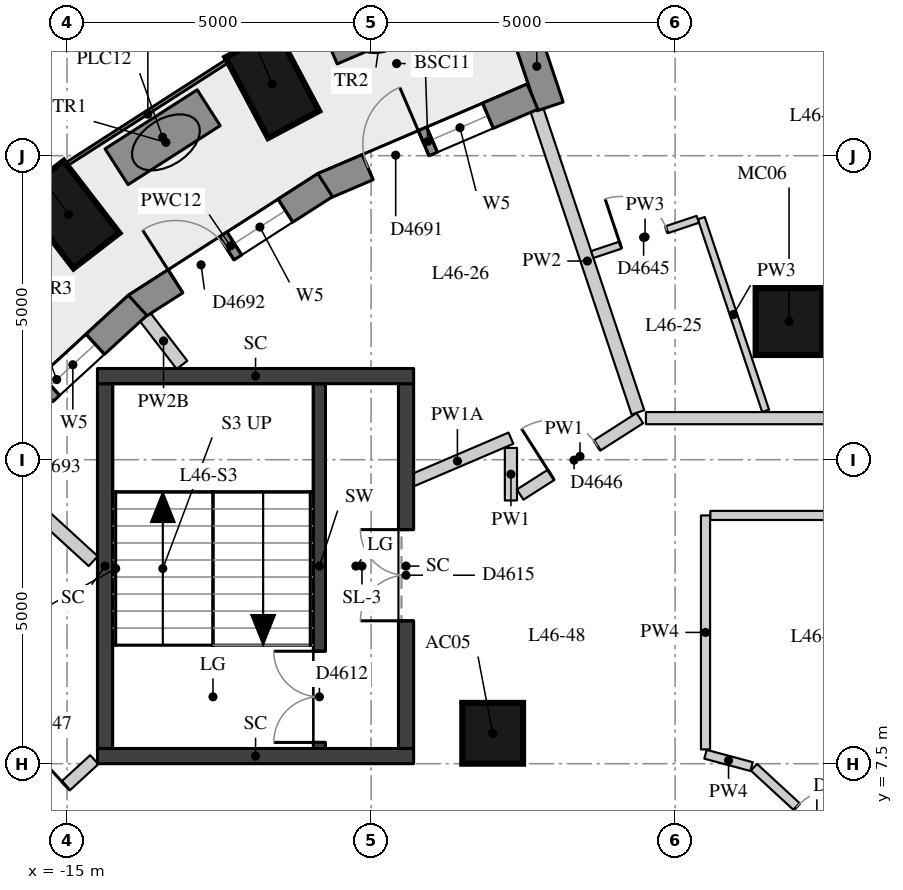
"""IFC4 building model, lengths in metres.
Left out: names, types, materials, properties, quantities, classifications, styles, units other than length and angle.
Written with IfcOpenShell. Run it as: python <this file> out.ifc"""

import sys

from ifc_helpers import new_model, si_unit, direction, frame, frame_2d, origin, origin_2d, place, context, subcontext, project, spatial, rectangle, extrude, element, fill, save


model = new_model("IFC4")
c1 = context("Model", 3, precision=1e-05, world=origin(), true_north=direction((0.0, 1.0)))
c2 = subcontext(c1, "Body", "Model", "MODEL_VIEW")
j1 = project(units=[si_unit("LENGTHUNIT", "METRE"), si_unit("PLANEANGLEUNIT", "RADIAN")], contexts=[c1])
p1 = place(None, origin())
s1 = spatial("IfcSite", under=j1, at=p1, CompositionType="ELEMENT")
p2 = place(p1, origin())
s2 = spatial("IfcBuilding", under=s1, at=p2, CompositionType="ELEMENT")
p3 = place(p2, frame((0.0, 0.0, 164.9)))
s3 = spatial("IfcBuildingStorey", under=s2, at=p3, CompositionType="ELEMENT", Elevation=164.9)
for number, where, z_axis, x_axis in (
    (1, (-11.625, 18.676, 0.0), (0.0, 0.0, 1.0), (-0.468, 0.884, 0.0)),
    (2, (-14.973, 16.532, 0.0), (0.0, 0.0, 1.0), (-0.61, 0.792, 0.0)),
):
    element("IfcColumn", number, at=place(p3, frame(where, z_axis=z_axis, x_axis=x_axis)), inside=s3, PredefinedType="COLUMN", context=c2, shape_type="SweptSolid", body=[
        extrude(rectangle(XDim=1.5, YDim=0.95, at=origin_2d()), origin(), (0.0, 0.0, 1.0), 3.3),
    ])
p4 = place(p3, frame((-8.0, 8.0, 0.0), z_axis=(0.0, 0.0, 1.0), x_axis=(1.0, 0.0, 0.0)))
e3 = element("IfcColumn", 3, at=p4, inside=s3, PredefinedType="COLUMN", context=c2, shape_type="SweptSolid", body=[
    extrude(rectangle(XDim=1.0, YDim=1.0, at=origin_2d()), origin(), (0.0, 0.0, 1.0), 3.3),
])
p5 = place(p3, frame((-3.126, 14.772, 0.0), z_axis=(0.0, 0.0, 1.0), x_axis=(1.0, 0.0, 0.0)))
e4 = element("IfcColumn", 4, at=p5, inside=s3, PredefinedType="COLUMN", context=c2, shape_type="SweptSolid", body=[
    extrude(rectangle(XDim=1.1, YDim=1.1, at=origin_2d()), origin(), (0.0, 0.0, 1.0), 3.3),
])
p6 = place(p3, frame((-7.495, 19.629, 0.0), z_axis=(0.0, 0.0, 1.0), x_axis=(0.316754470825, -0.948507567293, 0.0)))
e5 = element("IfcWall", 5, at=p6, inside=s3, PredefinedType="SOLIDWALL", context=c2, shape_type="SweptSolid", body=[
    extrude(rectangle(XDim=1.39, YDim=0.45, at=frame_2d((0.695, 0.0))), origin(), (0.0, 0.0, 1.0), 3.02),
])
p7 = place(p3, frame((-7.345, 18.47, 0.0), z_axis=(0.0, 0.0, 1.0), x_axis=(-0.919454986573, -0.393195279304, 0.0)))
e6 = element("IfcWall", 6, at=p7, inside=s3, PredefinedType="SOLIDWALL", context=c2, shape_type="SweptSolid", body=[
    extrude(rectangle(XDim=3.745, YDim=0.45, at=frame_2d((1.872, 0.0))), origin(), (0.0, 0.0, 1.0), 3.02),
])
p8 = place(p7, frame((0.797, 0.0, 0.4)))
e7 = element("IfcOpeningElement", 7, at=p8, cuts=e6, PredefinedType="OPENING", context=c2, shape_type="SweptSolid", body=[
    extrude(rectangle(XDim=1.0, YDim=1.75, at=frame_2d((0.5, 0.875))), frame((0.0, 0.235, 0.0), z_axis=(0.0, -1.0, 0.0), x_axis=(1.0, 0.0, 0.0)), (0.0, 0.0, 1.0), 0.47),
])
p9 = place(p7, frame((1.947, 0.0, 0.0)))
e8 = element("IfcOpeningElement", 8, at=p9, cuts=e6, PredefinedType="OPENING", context=c2, shape_type="SweptSolid", body=[
    extrude(rectangle(XDim=1.0, YDim=2.15, at=frame_2d((0.5, 1.075))), frame((0.0, 0.235, 0.0), z_axis=(0.0, -1.0, 0.0), x_axis=(1.0, 0.0, 0.0)), (0.0, 0.0, 1.0), 0.47),
])
p10 = place(p3, frame((-10.755, 17.016, 0.0), z_axis=(0.0, 0.0, 1.0), x_axis=(-0.841405539996, -0.540404216549, 0.0)))
e9 = element("IfcWall", 9, at=p10, inside=s3, PredefinedType="SOLIDWALL", context=c2, shape_type="SweptSolid", body=[
    extrude(rectangle(XDim=3.702, YDim=0.45, at=frame_2d((1.851, 0.0))), origin(), (0.0, 0.0, 1.0), 3.02),
])
p11 = place(p10, frame((0.776, 0.0, 0.4)))
e10 = element("IfcOpeningElement", 10, at=p11, cuts=e9, PredefinedType="OPENING", context=c2, shape_type="SweptSolid", body=[
    extrude(rectangle(XDim=1.0, YDim=1.75, at=frame_2d((0.5, 0.875))), frame((0.0, 0.235, 0.0), z_axis=(0.0, -1.0, 0.0), x_axis=(1.0, 0.0, 0.0)), (0.0, 0.0, 1.0), 0.47),
])
p12 = place(p10, frame((1.926, 0.0, 0.0)))
e11 = element("IfcOpeningElement", 11, at=p12, cuts=e9, PredefinedType="OPENING", context=c2, shape_type="SweptSolid", body=[
    extrude(rectangle(XDim=1.0, YDim=2.15, at=frame_2d((0.5, 1.075))), frame((0.0, 0.235, 0.0), z_axis=(0.0, -1.0, 0.0), x_axis=(1.0, 0.0, 0.0)), (0.0, 0.0, 1.0), 0.47),
])
p13 = place(p3, frame((-13.839, 15.039, 0.0), z_axis=(0.0, 0.0, 1.0), x_axis=(-0.736971705023, -0.675923594791, 0.0)))
e12 = element("IfcWall", 12, at=p13, inside=s3, PredefinedType="SOLIDWALL", context=c2, shape_type="SweptSolid", body=[
    extrude(rectangle(XDim=3.611, YDim=0.45, at=frame_2d((1.806, 0.0))), origin(), (0.0, 0.0, 1.0), 3.02),
])
p14 = place(p13, frame((0.946, 0.0, 0.4)))
e13 = element("IfcOpeningElement", 13, at=p14, cuts=e12, PredefinedType="OPENING", context=c2, shape_type="SweptSolid", body=[
    extrude(rectangle(XDim=1.0, YDim=1.75, at=frame_2d((0.5, 0.875))), frame((0.0, 0.235, 0.0), z_axis=(0.0, -1.0, 0.0), x_axis=(1.0, 0.0, 0.0)), (0.0, 0.0, 1.0), 0.47),
])
p15 = place(p13, frame((2.096, 0.0, 0.0)))
e14 = element("IfcOpeningElement", 14, at=p15, cuts=e12, PredefinedType="OPENING", context=c2, shape_type="SweptSolid", body=[
    extrude(rectangle(XDim=1.0, YDim=2.15, at=frame_2d((0.5, 1.075))), frame((0.0, 0.235, 0.0), z_axis=(0.0, -1.0, 0.0), x_axis=(1.0, 0.0, 0.0)), (0.0, 0.0, 1.0), 0.47),
])
for number, where, z_axis, x_axis in (
    (15, (-9.039, 20.038, 0.0), (0.0, 0.0, 1.0), (-0.92, -0.392, 0.0)),
    (16, (-12.67, 18.289, 0.0), (0.0, 0.0, 1.0), (-0.842, -0.539, 0.0)),
):
    element("IfcWall", number, at=place(p3, frame(where, z_axis=z_axis, x_axis=x_axis)), inside=s3, PredefinedType="USERDEFINED", context=c2, shape_type="SweptSolid", body=[
        extrude(rectangle(XDim=1.8, YDim=0.7, at=frame_2d((0.9, 0.0))), origin(), (0.0, 0.0, 1.0), 0.75),
    ])
p16 = place(p3, frame((-10.85, 7.75, 0.0), z_axis=(0.0, 0.0, 1.0), x_axis=(0.0, 1.0, 0.0)))
e17 = element("IfcWall", 17, at=p16, inside=s3, PredefinedType="SHEAR", context=c2, shape_type="SweptSolid", body=[
    extrude(rectangle(XDim=6.0, YDim=0.2, at=frame_2d((3.0, 0.0))), origin(), (0.0, 0.0, 1.0), 3.02),
])
p17 = place(p16, frame((0.1, 0.0, 0.0)))
e18 = element("IfcOpeningElement", 18, at=p17, cuts=e17, PredefinedType="OPENING", context=c2, shape_type="SweptSolid", body=[
    extrude(rectangle(XDim=1.5, YDim=2.1, at=frame_2d((0.75, 1.05))), frame((0.0, 0.11, 0.0), z_axis=(0.0, -1.0, 0.0), x_axis=(1.0, 0.0, 0.0)), (0.0, 0.0, 1.0), 0.22),
])
p18 = place(p3, frame((-14.375, 7.75, -0.28), z_axis=(0.0, 0.0, 1.0), x_axis=(0.0, 1.0, 0.0)))
e19 = element("IfcWall", 19, at=p18, inside=s3, PredefinedType="SHEAR", context=c2, shape_type="SweptSolid", body=[
    extrude(rectangle(XDim=6.0, YDim=0.25, at=frame_2d((3.0, 0.0))), origin(), (0.0, 0.0, 1.0), 3.3),
])
p19 = place(p3, frame((-9.425, 7.75, -0.28), z_axis=(0.0, 0.0, 1.0), x_axis=(0.0, 1.0, 0.0)))
e20 = element("IfcWall", 20, at=p19, inside=s3, PredefinedType="SHEAR", context=c2, shape_type="SweptSolid", body=[
    extrude(rectangle(XDim=6.0, YDim=0.25, at=frame_2d((3.0, 0.0))), origin(), (0.0, 0.0, 1.0), 3.3),
])
p20 = place(p19, frame((2.1, 0.0, 0.28)))
e21 = element("IfcOpeningElement", 21, at=p20, cuts=e20, PredefinedType="OPENING", context=c2, shape_type="SweptSolid", body=[
    extrude(rectangle(XDim=1.5, YDim=2.1, at=frame_2d((0.75, 1.05))), frame((0.0, 0.135, 0.0), z_axis=(0.0, -1.0, 0.0), x_axis=(1.0, 0.0, 0.0)), (0.0, 0.0, 1.0), 0.27),
])
for number, where, z_axis, x_axis in (
    (22, (-14.5, 13.875, -0.28), (0.0, 0.0, 1.0), (1.0, 0.0, 0.0)),
    (23, (-14.5, 7.625, -0.28), (0.0, 0.0, 1.0), (1.0, 0.0, 0.0)),
):
    element("IfcWall", number, at=place(p3, frame(where, z_axis=z_axis, x_axis=x_axis)), inside=s3, PredefinedType="SHEAR", context=c2, shape_type="SweptSolid", body=[
        extrude(rectangle(XDim=5.2, YDim=0.25, at=frame_2d((2.6, 0.0))), origin(), (0.0, 0.0, 1.0), 3.3),
    ])
p21 = place(p3, frame((-16.154, 6.097, 0.0), z_axis=(0.0, 0.0, 1.0), x_axis=(0.736958194284, 0.675938325498, 0.0)))
e24 = element("IfcWall", 24, at=p21, inside=s3, PredefinedType="PARTITIONING", context=c2, shape_type="SweptSolid", body=[
    extrude(rectangle(XDim=2.173, YDim=0.2, at=frame_2d((1.086, 0.0))), origin(), (0.0, 0.0, 1.0), 3.02),
])
p22 = place(p21, frame((0.636, 0.0, 0.0)))
e25 = element("IfcOpeningElement", 25, at=p22, cuts=e24, PredefinedType="OPENING", context=c2, shape_type="SweptSolid", body=[
    extrude(rectangle(XDim=0.9, YDim=2.1, at=frame_2d((0.45, 1.05))), frame((0.0, 0.11, 0.0), z_axis=(0.0, -1.0, 0.0), x_axis=(1.0, 0.0, 0.0)), (0.0, 0.0, 1.0), 0.22),
])
p23 = place(p3, frame((-9.46, 12.101, 0.0), z_axis=(0.0, 0.0, 1.0), x_axis=(0.919441549003, 0.393226700475, 0.0)))
e26 = element("IfcWall", 26, at=p23, inside=s3, PredefinedType="PARTITIONING", context=c2, shape_type="SweptSolid", body=[
    extrude(rectangle(XDim=1.915, YDim=0.2, at=frame_2d((0.958, 0.0))), origin(), (0.0, 0.0, 1.0), 2.57),
])
p24 = place(p3, frame((-7.7, 12.693, 0.0), z_axis=(0.0, 0.0, 1.0), x_axis=(0.0, -1.0, 0.0)))
e27 = element("IfcWall", 27, at=p24, inside=s3, PredefinedType="PARTITIONING", context=c2, shape_type="SweptSolid", body=[
    extrude(rectangle(XDim=0.864, YDim=0.2, at=frame_2d((0.432, 0.0))), origin(), (0.0, 0.0, 1.0), 3.02),
])
p25 = place(p3, frame((-7.548, 11.926, 0.0), z_axis=(0.0, 0.0, 1.0), x_axis=(0.842760799664, 0.538288244855, 0.0)))
e28 = element("IfcWall", 28, at=p25, inside=s3, PredefinedType="PARTITIONING", context=c2, shape_type="SweptSolid", body=[
    extrude(rectangle(XDim=2.336, YDim=0.2, at=frame_2d((1.168, 0.0))), origin(), (0.0, 0.0, 1.0), 3.02),
])
p26 = place(p25, frame((0.602, 0.0, 0.0)))
e29 = element("IfcOpeningElement", 29, at=p26, cuts=e28, PredefinedType="OPENING", context=c2, shape_type="SweptSolid", body=[
    extrude(rectangle(XDim=0.9, YDim=2.1, at=frame_2d((0.45, 1.05))), frame((0.0, 0.11, 0.0), z_axis=(0.0, -1.0, 0.0), x_axis=(1.0, 0.0, 0.0)), (0.0, 0.0, 1.0), 0.22),
])
p27 = place(p3, frame((-5.48, 13.183, 0.0), z_axis=(0.0, 0.0, 1.0), x_axis=(1.0, 0.0, 0.0)))
e30 = element("IfcWall", 30, at=p27, inside=s3, PredefinedType="PARTITIONING", context=c2, shape_type="SweptSolid", body=[
    extrude(rectangle(XDim=11.26, YDim=0.2, at=frame_2d((5.63, 0.0))), origin(), (0.0, 0.0, 1.0), 3.02),
])
p28 = place(p27, frame((9.368, 0.0, 0.0)))
e31 = element("IfcOpeningElement", 31, at=p28, cuts=e30, PredefinedType="OPENING", context=c2, shape_type="SweptSolid", body=[
    extrude(rectangle(XDim=1.1, YDim=2.1, at=frame_2d((0.55, 1.05))), frame((0.0, 0.11, 0.0), z_axis=(0.0, -1.0, 0.0), x_axis=(1.0, 0.0, 0.0)), (0.0, 0.0, 1.0), 0.22),
])
p29 = place(p27, frame((3.115, 0.0, 0.0)))
e32 = element("IfcOpeningElement", 32, at=p29, cuts=e30, PredefinedType="OPENING", context=c2, shape_type="SweptSolid", body=[
    extrude(rectangle(XDim=1.1, YDim=2.1, at=frame_2d((0.55, 1.05))), frame((0.0, 0.11, 0.0), z_axis=(0.0, -1.0, 0.0), x_axis=(1.0, 0.0, 0.0)), (0.0, 0.0, 1.0), 0.22),
])
p30 = place(p3, frame((-1.634, 5.534, 0.0), z_axis=(0.0, 0.0, 1.0), x_axis=(-0.735398368623, 0.67763503409, 0.0)))
e33 = element("IfcWall", 33, at=p30, inside=s3, PredefinedType="PARTITIONING", context=c2, shape_type="SweptSolid", body=[
    extrude(rectangle(XDim=2.815, YDim=0.15, at=frame_2d((1.407, 0.0))), origin(), (0.0, 0.0, 1.0), 3.02),
])
p31 = place(p30, frame((0.958, 0.0, 0.0)))
e34 = element("IfcOpeningElement", 34, at=p31, cuts=e33, PredefinedType="OPENING", context=c2, shape_type="SweptSolid", body=[
    extrude(rectangle(XDim=0.9, YDim=2.1, at=frame_2d((0.45, 1.05))), frame((0.0, 0.085, 0.0), z_axis=(0.0, -1.0, 0.0), x_axis=(1.0, 0.0, 0.0)), (0.0, 0.0, 1.0), 0.17),
])
p32 = place(p3, frame((-3.742, 7.452, 0.0), z_axis=(0.0, 0.0, 1.0), x_axis=(-0.965903596155, 0.258901994846, 0.0)))
e35 = element("IfcWall", 35, at=p32, inside=s3, PredefinedType="PARTITIONING", context=c2, shape_type="SweptSolid", body=[
    extrude(rectangle(XDim=0.785, YDim=0.15, at=frame_2d((0.392, 0.0))), origin(), (0.0, 0.0, 1.0), 3.02),
])
p33 = place(p3, frame((-4.5, 7.735, 0.0), z_axis=(0.0, 0.0, 1.0), x_axis=(0.0, 1.0, 0.0)))
e36 = element("IfcWall", 36, at=p33, inside=s3, PredefinedType="PARTITIONING", context=c2, shape_type="SweptSolid", body=[
    extrude(rectangle(XDim=3.848, YDim=0.15, at=frame_2d((1.924, 0.0))), origin(), (0.0, 0.0, 1.0), 3.02),
])
p34 = place(p3, frame((-4.42, 11.583, 0.0), z_axis=(0.0, 0.0, 1.0), x_axis=(1.0, 0.0, 0.0)))
e37 = element("IfcWall", 37, at=p34, inside=s3, PredefinedType="PARTITIONING", context=c2, shape_type="SweptSolid", body=[
    extrude(rectangle(XDim=5.82, YDim=0.15, at=frame_2d((2.91, 0.0))), origin(), (0.0, 0.0, 1.0), 3.02),
])
p35 = place(p3, frame((-7.274, 18.256, 0.0), z_axis=(0.0, 0.0, 1.0), x_axis=(0.316758050248, -0.948506371936, 0.0)))
e38 = element("IfcWall", 38, at=p35, inside=s3, PredefinedType="PARTITIONING", context=c2, shape_type="SweptSolid", body=[
    extrude(rectangle(XDim=5.248, YDim=0.22, at=frame_2d((2.624, 0.0))), origin(), (0.0, 0.0, 1.0), 3.02),
])
p36 = place(p3, frame((-13.716, 14.846, 0.0), z_axis=(0.0, 0.0, 1.0), x_axis=(0.609971806764, -0.792423116115, 0.0)))
e39 = element("IfcWall", 39, at=p36, inside=s3, PredefinedType="PARTITIONING", context=c2, shape_type="SweptSolid", body=[
    extrude(rectangle(XDim=0.994, YDim=0.22, at=frame_2d((0.497, 0.0))), origin(), (0.0, 0.0, 1.0), 2.57),
])
p37 = place(p3, frame((-16.334, 12.445, 0.0), z_axis=(0.0, 0.0, 1.0), x_axis=(0.737857346278, -0.674956692347, 0.0)))
e40 = element("IfcWall", 40, at=p37, inside=s3, PredefinedType="PARTITIONING", context=c2, shape_type="SweptSolid", body=[
    extrude(rectangle(XDim=2.391, YDim=0.22, at=frame_2d((1.195, 0.0))), origin(), (0.0, 0.0, 1.0), 3.02),
])
p38 = place(p3, frame((-21.239, 7.16, 0.0), z_axis=(0.0, 0.0, 1.0), x_axis=(0.929520145478, -0.368771337215, 0.0)))
e41 = element("IfcWall", 41, at=p38, inside=s3, PredefinedType="PARTITIONING", context=c2, shape_type="SweptSolid", body=[
    extrude(rectangle(XDim=6.544, YDim=0.22, at=frame_2d((3.272, 0.0))), origin(), (0.0, 0.0, 1.0), 3.02),
])
p39 = place(p3, frame((-3.511, 13.302, 0.0), z_axis=(0.0, 0.0, 1.0), x_axis=(-0.316666024344, 0.948537099447, 0.0)))
e42 = element("IfcWall", 42, at=p39, inside=s3, PredefinedType="PARTITIONING", context=c2, shape_type="SweptSolid", body=[
    extrude(rectangle(XDim=3.342, YDim=0.12, at=frame_2d((1.671, 0.0))), origin(), (0.0, 0.0, 1.0), 3.02),
])
p40 = place(p3, frame((-4.626, 16.454, 0.0), z_axis=(0.0, 0.0, 1.0), x_axis=(-0.9485230882, -0.31670799035, 0.0)))
e43 = element("IfcWall", 43, at=p40, inside=s3, PredefinedType="PARTITIONING", context=c2, shape_type="SweptSolid", body=[
    extrude(rectangle(XDim=1.83, YDim=0.12, at=frame_2d((0.915, 0.0))), origin(), (0.0, 0.0, 1.0), 3.02),
])
p41 = place(p40, frame((0.54, 0.0, 0.0)))
e44 = element("IfcOpeningElement", 44, at=p41, cuts=e43, PredefinedType="OPENING", context=c2, shape_type="SweptSolid", body=[
    extrude(rectangle(XDim=0.8, YDim=2.1, at=frame_2d((0.4, 1.05))), frame((0.0, 0.07, 0.0), z_axis=(0.0, -1.0, 0.0), x_axis=(1.0, 0.0, 0.0)), (0.0, 0.0, 1.0), 0.14),
])
p42 = place(p8, origin())
e45 = element("IfcWindow", 45, at=p42, inside=s3, PartitioningType="SINGLE_PANEL", PredefinedType="WINDOW", context=c2, shape_type="SweptSolid", body=[
    extrude(rectangle(XDim=1.0, YDim=1.75, at=frame_2d((0.5, 0.875))), frame((0.0, 0.035, 0.0), z_axis=(0.0, -1.0, 0.0), x_axis=(1.0, 0.0, 0.0)), (0.0, 0.0, 1.0), 0.06),
])
fill(e7, e45)
p43 = place(p9, frame((1.0, 0.0, 0.0), z_axis=(0.0, 0.0, 1.0), x_axis=(-1.0, 0.0, 0.0)))
e46 = element("IfcDoor", 46, at=p43, inside=s3, OperationType="SINGLE_SWING_RIGHT", PredefinedType="DOOR", context=c2, shape_type="SweptSolid", body=[
    extrude(rectangle(XDim=1.0, YDim=2.15, at=frame_2d((0.5, 1.075))), frame((0.0, 0.075, 0.0), z_axis=(0.0, -1.0, 0.0), x_axis=(1.0, 0.0, 0.0)), (0.0, 0.0, 1.0), 0.05),
])
fill(e8, e46)
p44 = place(p11, origin())
e47 = element("IfcWindow", 47, at=p44, inside=s3, PartitioningType="SINGLE_PANEL", PredefinedType="WINDOW", context=c2, shape_type="SweptSolid", body=[
    extrude(rectangle(XDim=1.0, YDim=1.75, at=frame_2d((0.5, 0.875))), frame((0.0, 0.035, 0.0), z_axis=(0.0, -1.0, 0.0), x_axis=(1.0, 0.0, 0.0)), (0.0, 0.0, 1.0), 0.06),
])
fill(e10, e47)
p45 = place(p12, frame((1.0, 0.0, 0.0), z_axis=(0.0, 0.0, 1.0), x_axis=(-1.0, 0.0, 0.0)))
e48 = element("IfcDoor", 48, at=p45, inside=s3, OperationType="SINGLE_SWING_LEFT", PredefinedType="DOOR", context=c2, shape_type="SweptSolid", body=[
    extrude(rectangle(XDim=1.0, YDim=2.15, at=frame_2d((0.5, 1.075))), frame((0.0, 0.075, 0.0), z_axis=(0.0, -1.0, 0.0), x_axis=(1.0, 0.0, 0.0)), (0.0, 0.0, 1.0), 0.05),
])
fill(e11, e48)
p46 = place(p14, origin())
e49 = element("IfcWindow", 49, at=p46, inside=s3, PartitioningType="SINGLE_PANEL", PredefinedType="WINDOW", context=c2, shape_type="SweptSolid", body=[
    extrude(rectangle(XDim=1.0, YDim=1.75, at=frame_2d((0.5, 0.875))), frame((0.0, 0.035, 0.0), z_axis=(0.0, -1.0, 0.0), x_axis=(1.0, 0.0, 0.0)), (0.0, 0.0, 1.0), 0.06),
])
fill(e13, e49)
p47 = place(p17, origin())
e50 = element("IfcDoor", 50, at=p47, inside=s3, OperationType="DOUBLE_DOOR_SINGLE_SWING", PredefinedType="DOOR", context=c2, shape_type="SweptSolid", body=[
    extrude(rectangle(XDim=1.5, YDim=2.1, at=frame_2d((0.75, 1.05))), frame((0.0, 0.025, 0.0), z_axis=(0.0, -1.0, 0.0), x_axis=(1.0, 0.0, 0.0)), (0.0, 0.0, 1.0), 0.05),
])
fill(e18, e50)
p48 = place(p20, origin())
e51 = element("IfcDoor", 51, at=p48, inside=s3, OperationType="DOUBLE_DOOR_SINGLE_SWING", PredefinedType="DOOR", context=c2, shape_type="SweptSolid", body=[
    extrude(rectangle(XDim=1.5, YDim=2.1, at=frame_2d((0.75, 1.05))), frame((0.0, 0.025, 0.0), z_axis=(0.0, -1.0, 0.0), x_axis=(1.0, 0.0, 0.0)), (0.0, 0.0, 1.0), 0.05),
])
fill(e21, e51)
p49 = place(p41, origin())
e52 = element("IfcDoor", 52, at=p49, inside=s3, OperationType="SINGLE_SWING_LEFT", PredefinedType="DOOR", context=c2, shape_type="SweptSolid", body=[
    extrude(rectangle(XDim=0.8, YDim=2.1, at=frame_2d((0.4, 1.05))), frame((0.0, 0.025, 0.0), z_axis=(0.0, -1.0, 0.0), x_axis=(1.0, 0.0, 0.0)), (0.0, 0.0, 1.0), 0.05),
])
fill(e44, e52)
p50 = place(p26, origin())
e53 = element("IfcDoor", 53, at=p50, inside=s3, OperationType="SINGLE_SWING_LEFT", PredefinedType="DOOR", context=c2, shape_type="SweptSolid", body=[
    extrude(rectangle(XDim=0.9, YDim=2.1, at=frame_2d((0.45, 1.05))), frame((0.0, 0.025, 0.0), z_axis=(0.0, -1.0, 0.0), x_axis=(1.0, 0.0, 0.0)), (0.0, 0.0, 1.0), 0.05),
])
fill(e29, e53)
p51 = place(p22, origin())
e54 = element("IfcDoor", 54, at=p51, inside=s3, OperationType="SINGLE_SWING_RIGHT", PredefinedType="DOOR", context=c2, shape_type="SweptSolid", body=[
    extrude(rectangle(XDim=0.9, YDim=2.1, at=frame_2d((0.45, 1.05))), frame((0.0, 0.025, 0.0), z_axis=(0.0, -1.0, 0.0), x_axis=(1.0, 0.0, 0.0)), (0.0, 0.0, 1.0), 0.05),
])
fill(e25, e54)
p52 = place(p31, origin())
e55 = element("IfcDoor", 55, at=p52, inside=s3, OperationType="SINGLE_SWING_RIGHT", PredefinedType="DOOR", context=c2, shape_type="SweptSolid", body=[
    extrude(rectangle(XDim=0.9, YDim=2.1, at=frame_2d((0.45, 1.05))), frame((0.0, 0.025, 0.0), z_axis=(0.0, -1.0, 0.0), x_axis=(1.0, 0.0, 0.0)), (0.0, 0.0, 1.0), 0.05),
])
fill(e34, e55)
save(model, sys.argv[1])
